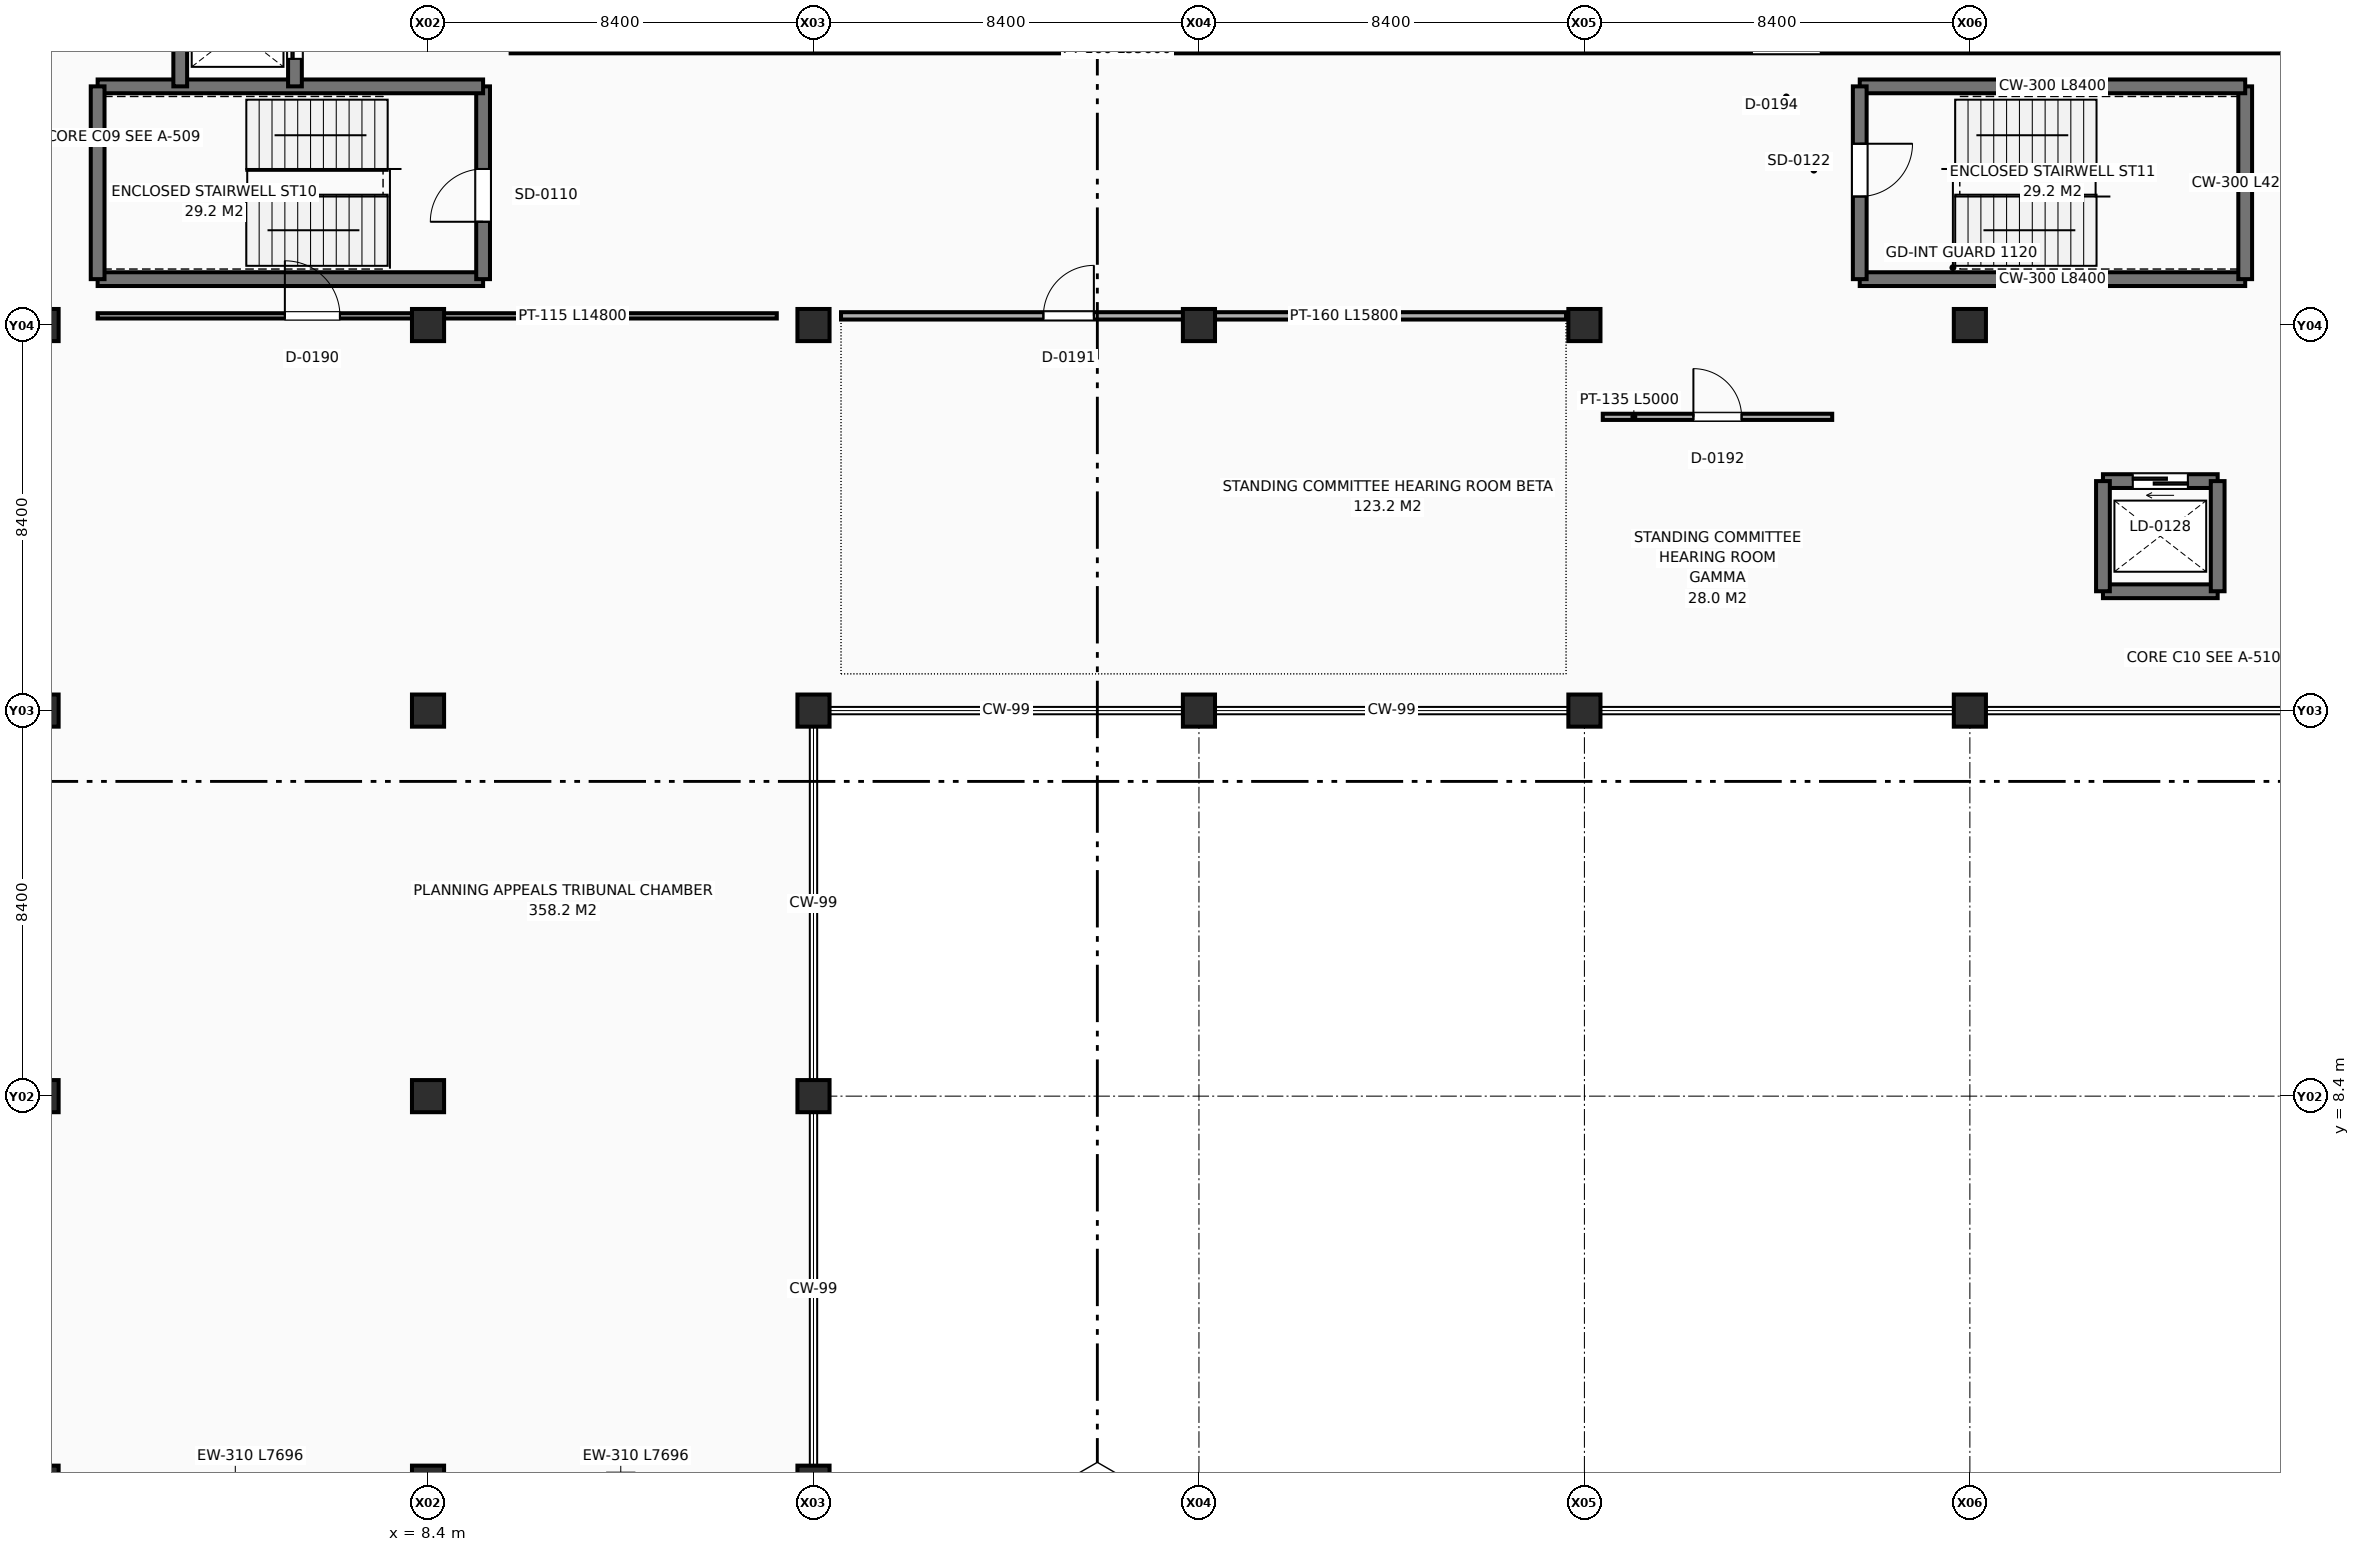
"""IFC4 building model, lengths in metres.
Left out: names, types, materials, properties, quantities, classifications, styles, units other than length and angle.
Written with IfcOpenShell. Run it as: python <this file> out.ifc"""

import sys

from ifc_helpers import new_model, si_unit, direction, frame, frame_2d, origin, origin_2d, place, context, subcontext, project, spatial, rectangle, extrude, element, fill, save


model = new_model("IFC4")
c1 = context("Model", 3, precision=1e-05, world=origin(), true_north=direction((0.0, 1.0)))
c2 = subcontext(c1, "Body", "Model", "MODEL_VIEW")
j1 = project(units=[si_unit("LENGTHUNIT", "METRE"), si_unit("PLANEANGLEUNIT", "RADIAN")], contexts=[c1])
p1 = place(None, origin())
s1 = spatial("IfcSite", under=j1, at=p1, CompositionType="ELEMENT")
p2 = place(p1, origin())
s2 = spatial("IfcBuilding", under=s1, at=p2, CompositionType="ELEMENT")
p3 = place(p2, frame((0.0, 0.0, 5.4)))
s3 = spatial("IfcBuildingStorey", under=s2, at=p3, CompositionType="ELEMENT", Elevation=5.4)
for number, where, z_axis, x_axis in (
    (1, (0.0, 0.0, 0.0), (0.0, 0.0, 1.0), (1.0, 0.0, 0.0)),
    (2, (0.0, 8.4, 0.0), (0.0, 0.0, 1.0), (1.0, 0.0, 0.0)),
    (3, (0.0, 16.8, 0.0), (0.0, 0.0, 1.0), (1.0, 0.0, 0.0)),
    (4, (0.0, 25.2, 0.0), (0.0, 0.0, 1.0), (1.0, 0.0, 0.0)),
    (5, (8.4, 0.0, 0.0), (0.0, 0.0, 1.0), (1.0, 0.0, 0.0)),
    (6, (8.4, 8.4, 0.0), (0.0, 0.0, 1.0), (1.0, 0.0, 0.0)),
    (7, (8.4, 16.8, 0.0), (0.0, 0.0, 1.0), (1.0, 0.0, 0.0)),
    (8, (8.4, 25.2, 0.0), (0.0, 0.0, 1.0), (1.0, 0.0, 0.0)),
    (9, (16.8, 0.0, 0.0), (0.0, 0.0, 1.0), (1.0, 0.0, 0.0)),
    (10, (16.8, 8.4, 0.0), (0.0, 0.0, 1.0), (1.0, 0.0, 0.0)),
    (11, (16.8, 16.8, 0.0), (0.0, 0.0, 1.0), (1.0, 0.0, 0.0)),
    (12, (16.8, 25.2, 0.0), (0.0, 0.0, 1.0), (1.0, 0.0, 0.0)),
    (13, (25.2, 16.8, 0.0), (0.0, 0.0, 1.0), (1.0, 0.0, 0.0)),
    (14, (25.2, 25.2, 0.0), (0.0, 0.0, 1.0), (1.0, 0.0, 0.0)),
    (15, (33.6, 16.8, 0.0), (0.0, 0.0, 1.0), (1.0, 0.0, 0.0)),
    (16, (33.6, 25.2, 0.0), (0.0, 0.0, 1.0), (1.0, 0.0, 0.0)),
    (17, (42.0, 16.8, 0.0), (0.0, 0.0, 1.0), (1.0, 0.0, 0.0)),
    (18, (42.0, 25.2, 0.0), (0.0, 0.0, 1.0), (1.0, 0.0, 0.0)),
):
    element("IfcColumn", number, at=place(p3, frame(where, z_axis=z_axis, x_axis=x_axis)), inside=s3, PredefinedType="COLUMN", context=c2, shape_type="SweptSolid", body=[
        extrude(rectangle(XDim=0.7, YDim=0.7, at=origin_2d()), origin(), (0.0, 0.0, 1.0), 4.2),
    ])
p4 = place(p3, frame((1.2, 26.2, 0.0), z_axis=(0.0, 0.0, 1.0), x_axis=(1.0, 0.0, 0.0)))
e19 = element("IfcWall", 19, at=p4, inside=s3, PredefinedType="SHEAR", context=c2, shape_type="SweptSolid", body=[
    extrude(rectangle(XDim=8.4, YDim=0.3, at=frame_2d((4.2, 0.0))), origin(), (0.0, 0.0, 1.0), 3.92),
])
p5 = place(p3, frame((9.6, 26.2, 0.0), z_axis=(0.0, 0.0, 1.0), x_axis=(0.0, 1.0, 0.0)))
e20 = element("IfcWall", 20, at=p5, inside=s3, PredefinedType="SHEAR", context=c2, shape_type="SweptSolid", body=[
    extrude(rectangle(XDim=4.2, YDim=0.3, at=frame_2d((2.1, 0.0))), origin(), (0.0, 0.0, 1.0), 3.92),
])
p6 = place(p5, frame((1.25, 0.0, 0.0)))
e21 = element("IfcOpeningElement", 21, at=p6, cuts=e20, PredefinedType="OPENING", context=c2, shape_type="SweptSolid", body=[
    extrude(rectangle(XDim=1.15, YDim=2.2, at=frame_2d((0.575, 1.1))), frame((0.0, 0.16, 0.0), z_axis=(0.0, -1.0, 0.0), x_axis=(1.0, 0.0, 0.0)), (0.0, 0.0, 1.0), 0.32),
])
p7 = place(p3, frame((9.6, 30.4, 0.0), z_axis=(0.0, 0.0, 1.0), x_axis=(-1.0, 0.0, 0.0)))
e22 = element("IfcWall", 22, at=p7, inside=s3, PredefinedType="SHEAR", context=c2, shape_type="SweptSolid", body=[
    extrude(rectangle(XDim=8.4, YDim=0.3, at=frame_2d((4.2, 0.0))), origin(), (0.0, 0.0, 1.0), 3.92),
])
p8 = place(p3, frame((1.2, 30.4, 0.0), z_axis=(0.0, 0.0, 1.0), x_axis=(0.0, -1.0, 0.0)))
e23 = element("IfcWall", 23, at=p8, inside=s3, PredefinedType="SHEAR", context=c2, shape_type="SweptSolid", body=[
    extrude(rectangle(XDim=4.2, YDim=0.3, at=frame_2d((2.1, 0.0))), origin(), (0.0, 0.0, 1.0), 3.92),
])
p9 = place(p3, frame((3.0, 32.8, 0.0), z_axis=(0.0, 0.0, 1.0), x_axis=(0.0, -1.0, 0.0)))
e24 = element("IfcWall", 24, at=p9, inside=s3, PredefinedType="SHEAR", context=c2, shape_type="SweptSolid", body=[
    extrude(rectangle(XDim=2.4, YDim=0.3, at=frame_2d((1.2, 0.0))), origin(), (0.0, 0.0, 1.0), 3.92),
])
p10 = place(p3, frame((5.5, 30.4, 0.0), z_axis=(0.0, 0.0, 1.0), x_axis=(0.0, 1.0, 0.0)))
e25 = element("IfcWall", 25, at=p10, inside=s3, PredefinedType="SHEAR", context=c2, shape_type="SweptSolid", body=[
    extrude(rectangle(XDim=2.4, YDim=0.3, at=frame_2d((1.2, 0.0))), origin(), (0.0, 0.0, 1.0), 3.92),
])
p11 = place(p10, frame((0.6, 0.0, 0.0)))
e26 = element("IfcOpeningElement", 26, at=p11, cuts=e25, PredefinedType="OPENING", context=c2, shape_type="SweptSolid", body=[
    extrude(rectangle(XDim=1.2, YDim=2.25, at=frame_2d((0.6, 1.125))), frame((0.0, 0.16, 0.0), z_axis=(0.0, -1.0, 0.0), x_axis=(1.0, 0.0, 0.0)), (0.0, 0.0, 1.0), 0.32),
])
p12 = place(p3, frame((39.6, 26.2, 0.0), z_axis=(0.0, 0.0, 1.0), x_axis=(1.0, 0.0, 0.0)))
e27 = element("IfcWall", 27, at=p12, inside=s3, PredefinedType="SHEAR", context=c2, shape_type="SweptSolid", body=[
    extrude(rectangle(XDim=8.4, YDim=0.3, at=frame_2d((4.2, 0.0))), origin(), (0.0, 0.0, 1.0), 3.92),
])
p13 = place(p3, frame((48.0, 26.2, 0.0), z_axis=(0.0, 0.0, 1.0), x_axis=(0.0, 1.0, 0.0)))
e28 = element("IfcWall", 28, at=p13, inside=s3, PredefinedType="SHEAR", context=c2, shape_type="SweptSolid", body=[
    extrude(rectangle(XDim=4.2, YDim=0.3, at=frame_2d((2.1, 0.0))), origin(), (0.0, 0.0, 1.0), 3.92),
])
p14 = place(p3, frame((48.0, 30.4, 0.0), z_axis=(0.0, 0.0, 1.0), x_axis=(-1.0, 0.0, 0.0)))
e29 = element("IfcWall", 29, at=p14, inside=s3, PredefinedType="SHEAR", context=c2, shape_type="SweptSolid", body=[
    extrude(rectangle(XDim=8.4, YDim=0.3, at=frame_2d((4.2, 0.0))), origin(), (0.0, 0.0, 1.0), 3.92),
])
p15 = place(p3, frame((39.6, 30.4, 0.0), z_axis=(0.0, 0.0, 1.0), x_axis=(0.0, -1.0, 0.0)))
e30 = element("IfcWall", 30, at=p15, inside=s3, PredefinedType="SHEAR", context=c2, shape_type="SweptSolid", body=[
    extrude(rectangle(XDim=4.2, YDim=0.3, at=frame_2d((2.1, 0.0))), origin(), (0.0, 0.0, 1.0), 3.92),
])
p16 = place(p15, frame((1.25, 0.0, 0.0)))
e31 = element("IfcOpeningElement", 31, at=p16, cuts=e30, PredefinedType="OPENING", context=c2, shape_type="SweptSolid", body=[
    extrude(rectangle(XDim=1.15, YDim=2.2, at=frame_2d((0.575, 1.1))), frame((0.0, 0.16, 0.0), z_axis=(0.0, -1.0, 0.0), x_axis=(1.0, 0.0, 0.0)), (0.0, 0.0, 1.0), 0.32),
])
p17 = place(p3, frame((47.4, 21.8, 0.0), z_axis=(0.0, 0.0, 1.0), x_axis=(-1.0, 0.0, 0.0)))
e32 = element("IfcWall", 32, at=p17, inside=s3, PredefinedType="SHEAR", context=c2, shape_type="SweptSolid", body=[
    extrude(rectangle(XDim=2.5, YDim=0.3, at=frame_2d((1.25, 0.0))), origin(), (0.0, 0.0, 1.0), 3.92),
])
p18 = place(p17, frame((0.65, 0.0, 0.0)))
e33 = element("IfcOpeningElement", 33, at=p18, cuts=e32, PredefinedType="OPENING", context=c2, shape_type="SweptSolid", body=[
    extrude(rectangle(XDim=1.2, YDim=2.25, at=frame_2d((0.6, 1.125))), frame((0.0, 0.16, 0.0), z_axis=(0.0, -1.0, 0.0), x_axis=(1.0, 0.0, 0.0)), (0.0, 0.0, 1.0), 0.32),
])
p19 = place(p3, frame((44.9, 19.4, 0.0), z_axis=(0.0, 0.0, 1.0), x_axis=(1.0, 0.0, 0.0)))
e34 = element("IfcWall", 34, at=p19, inside=s3, PredefinedType="SHEAR", context=c2, shape_type="SweptSolid", body=[
    extrude(rectangle(XDim=2.5, YDim=0.3, at=frame_2d((1.25, 0.0))), origin(), (0.0, 0.0, 1.0), 3.92),
])
for number, where, z_axis, x_axis in (
    (35, (44.9, 21.8, 0.0), (0.0, 0.0, 1.0), (0.0, -1.0, 0.0)),
    (36, (47.4, 19.4, 0.0), (0.0, 0.0, 1.0), (0.0, 1.0, 0.0)),
):
    element("IfcWall", number, at=place(p3, frame(where, z_axis=z_axis, x_axis=x_axis)), inside=s3, PredefinedType="SHEAR", context=c2, shape_type="SweptSolid", body=[
        extrude(rectangle(XDim=2.4, YDim=0.3, at=frame_2d((1.2, 0.0))), origin(), (0.0, 0.0, 1.0), 3.92),
    ])
p20 = place(p3, frame((1.2, 25.4, 0.0), z_axis=(0.0, 0.0, 1.0), x_axis=(1.0, 0.0, 0.0)))
e37 = element("IfcWall", 37, at=p20, inside=s3, PredefinedType="PARTITIONING", context=c2, shape_type="SweptSolid", body=[
    extrude(rectangle(XDim=14.8, YDim=0.115, at=frame_2d((7.4, 0.0))), origin(), (0.0, 0.0, 1.0), 3.29),
])
p21 = place(p20, frame((4.08, 0.0, 0.0)))
e38 = element("IfcOpeningElement", 38, at=p21, cuts=e37, PredefinedType="OPENING", context=c2, shape_type="SweptSolid", body=[
    extrude(rectangle(XDim=1.2, YDim=2.2, at=frame_2d((0.6, 1.1))), frame((0.0, 0.067, 0.0), z_axis=(0.0, -1.0, 0.0), x_axis=(1.0, 0.0, 0.0)), (0.0, 0.0, 1.0), 0.135),
])
p22 = place(p3, frame((17.4, 25.4, 0.0), z_axis=(0.0, 0.0, 1.0), x_axis=(1.0, 0.0, 0.0)))
e39 = element("IfcWall", 39, at=p22, inside=s3, PredefinedType="PARTITIONING", context=c2, shape_type="SweptSolid", body=[
    extrude(rectangle(XDim=15.8, YDim=0.16, at=frame_2d((7.9, 0.0))), origin(), (0.0, 0.0, 1.0), 3.29),
])
p23 = place(p22, frame((4.41, 0.0, 0.0)))
e40 = element("IfcOpeningElement", 40, at=p23, cuts=e39, PredefinedType="OPENING", context=c2, shape_type="SweptSolid", body=[
    extrude(rectangle(XDim=1.1, YDim=2.15, at=frame_2d((0.55, 1.075))), frame((0.0, 0.09, 0.0), z_axis=(0.0, -1.0, 0.0), x_axis=(1.0, 0.0, 0.0)), (0.0, 0.0, 1.0), 0.18),
])
p24 = place(p3, frame((34.0, 23.2, 0.0), z_axis=(0.0, 0.0, 1.0), x_axis=(1.0, 0.0, 0.0)))
e41 = element("IfcWall", 41, at=p24, inside=s3, PredefinedType="PARTITIONING", context=c2, shape_type="SweptSolid", body=[
    extrude(rectangle(XDim=5.0, YDim=0.135, at=frame_2d((2.5, 0.0))), origin(), (0.0, 0.0, 1.0), 3.86),
])
p25 = place(p24, frame((1.975, 0.0, 0.0)))
e42 = element("IfcOpeningElement", 42, at=p25, cuts=e41, PredefinedType="OPENING", context=c2, shape_type="SweptSolid", body=[
    extrude(rectangle(XDim=1.05, YDim=2.15, at=frame_2d((0.525, 1.075))), frame((0.0, 0.077, 0.0), z_axis=(0.0, -1.0, 0.0), x_axis=(1.0, 0.0, 0.0)), (0.0, 0.0, 1.0), 0.155),
])
p26 = place(p3, frame((10.2, 31.2, 0.0), z_axis=(0.0, 0.0, 1.0), x_axis=(1.0, 0.0, 0.0)))
e43 = element("IfcWall", 43, at=p26, inside=s3, PredefinedType="PARTITIONING", context=c2, shape_type="SweptSolid", body=[
    extrude(rectangle(XDim=55.6, YDim=0.16, at=frame_2d((27.8, 0.0))), origin(), (0.0, 0.0, 1.0), 3.86),
])
p27 = place(p26, frame((27.05, 0.0, 0.0)))
e44 = element("IfcOpeningElement", 44, at=p27, cuts=e43, PredefinedType="OPENING", context=c2, shape_type="SweptSolid", body=[
    extrude(rectangle(XDim=1.5, YDim=2.35, at=frame_2d((0.75, 1.175))), frame((0.0, 0.09, 0.0), z_axis=(0.0, -1.0, 0.0), x_axis=(1.0, 0.0, 0.0)), (0.0, 0.0, 1.0), 0.18),
])
p28 = place(p6, origin())
e45 = element("IfcDoor", 45, at=p28, inside=s3, OperationType="SINGLE_SWING_LEFT", PredefinedType="DOOR", context=c2, shape_type="SweptSolid", body=[
    extrude(rectangle(XDim=1.15, YDim=2.2, at=frame_2d((0.575, 1.1))), frame((0.0, 0.025, 0.0), z_axis=(0.0, -1.0, 0.0), x_axis=(1.0, 0.0, 0.0)), (0.0, 0.0, 1.0), 0.05),
])
fill(e21, e45)
p29 = place(p11, origin())
e46 = element("IfcDoor", 46, at=p29, inside=s3, OperationType="SLIDING_TO_LEFT", PredefinedType="DOOR", context=c2, shape_type="SweptSolid", body=[
    extrude(rectangle(XDim=1.2, YDim=2.25, at=frame_2d((0.6, 1.125))), frame((0.0, 0.025, 0.0), z_axis=(0.0, -1.0, 0.0), x_axis=(1.0, 0.0, 0.0)), (0.0, 0.0, 1.0), 0.05),
])
fill(e26, e46)
p30 = place(p16, origin())
e47 = element("IfcDoor", 47, at=p30, inside=s3, OperationType="SINGLE_SWING_LEFT", PredefinedType="DOOR", context=c2, shape_type="SweptSolid", body=[
    extrude(rectangle(XDim=1.15, YDim=2.2, at=frame_2d((0.575, 1.1))), frame((0.0, 0.025, 0.0), z_axis=(0.0, -1.0, 0.0), x_axis=(1.0, 0.0, 0.0)), (0.0, 0.0, 1.0), 0.05),
])
fill(e31, e47)
p31 = place(p18, origin())
e48 = element("IfcDoor", 48, at=p31, inside=s3, OperationType="SLIDING_TO_LEFT", PredefinedType="DOOR", context=c2, shape_type="SweptSolid", body=[
    extrude(rectangle(XDim=1.2, YDim=2.25, at=frame_2d((0.6, 1.125))), frame((0.0, 0.025, 0.0), z_axis=(0.0, -1.0, 0.0), x_axis=(1.0, 0.0, 0.0)), (0.0, 0.0, 1.0), 0.05),
])
fill(e33, e48)
p32 = place(p21, origin())
e49 = element("IfcDoor", 49, at=p32, inside=s3, OperationType="SINGLE_SWING_LEFT", PredefinedType="DOOR", context=c2, shape_type="SweptSolid", body=[
    extrude(rectangle(XDim=1.2, YDim=2.2, at=frame_2d((0.6, 1.1))), frame((0.0, 0.025, 0.0), z_axis=(0.0, -1.0, 0.0), x_axis=(1.0, 0.0, 0.0)), (0.0, 0.0, 1.0), 0.05),
])
fill(e38, e49)
p33 = place(p23, origin())
e50 = element("IfcDoor", 50, at=p33, inside=s3, OperationType="SINGLE_SWING_RIGHT", PredefinedType="DOOR", context=c2, shape_type="SweptSolid", body=[
    extrude(rectangle(XDim=1.1, YDim=2.15, at=frame_2d((0.55, 1.075))), frame((0.0, 0.025, 0.0), z_axis=(0.0, -1.0, 0.0), x_axis=(1.0, 0.0, 0.0)), (0.0, 0.0, 1.0), 0.05),
])
fill(e40, e50)
p34 = place(p25, origin())
e51 = element("IfcDoor", 51, at=p34, inside=s3, OperationType="SINGLE_SWING_LEFT", PredefinedType="DOOR", context=c2, shape_type="SweptSolid", body=[
    extrude(rectangle(XDim=1.05, YDim=2.15, at=frame_2d((0.525, 1.075))), frame((0.0, 0.025, 0.0), z_axis=(0.0, -1.0, 0.0), x_axis=(1.0, 0.0, 0.0)), (0.0, 0.0, 1.0), 0.05),
])
fill(e42, e51)
save(model, sys.argv[1])
